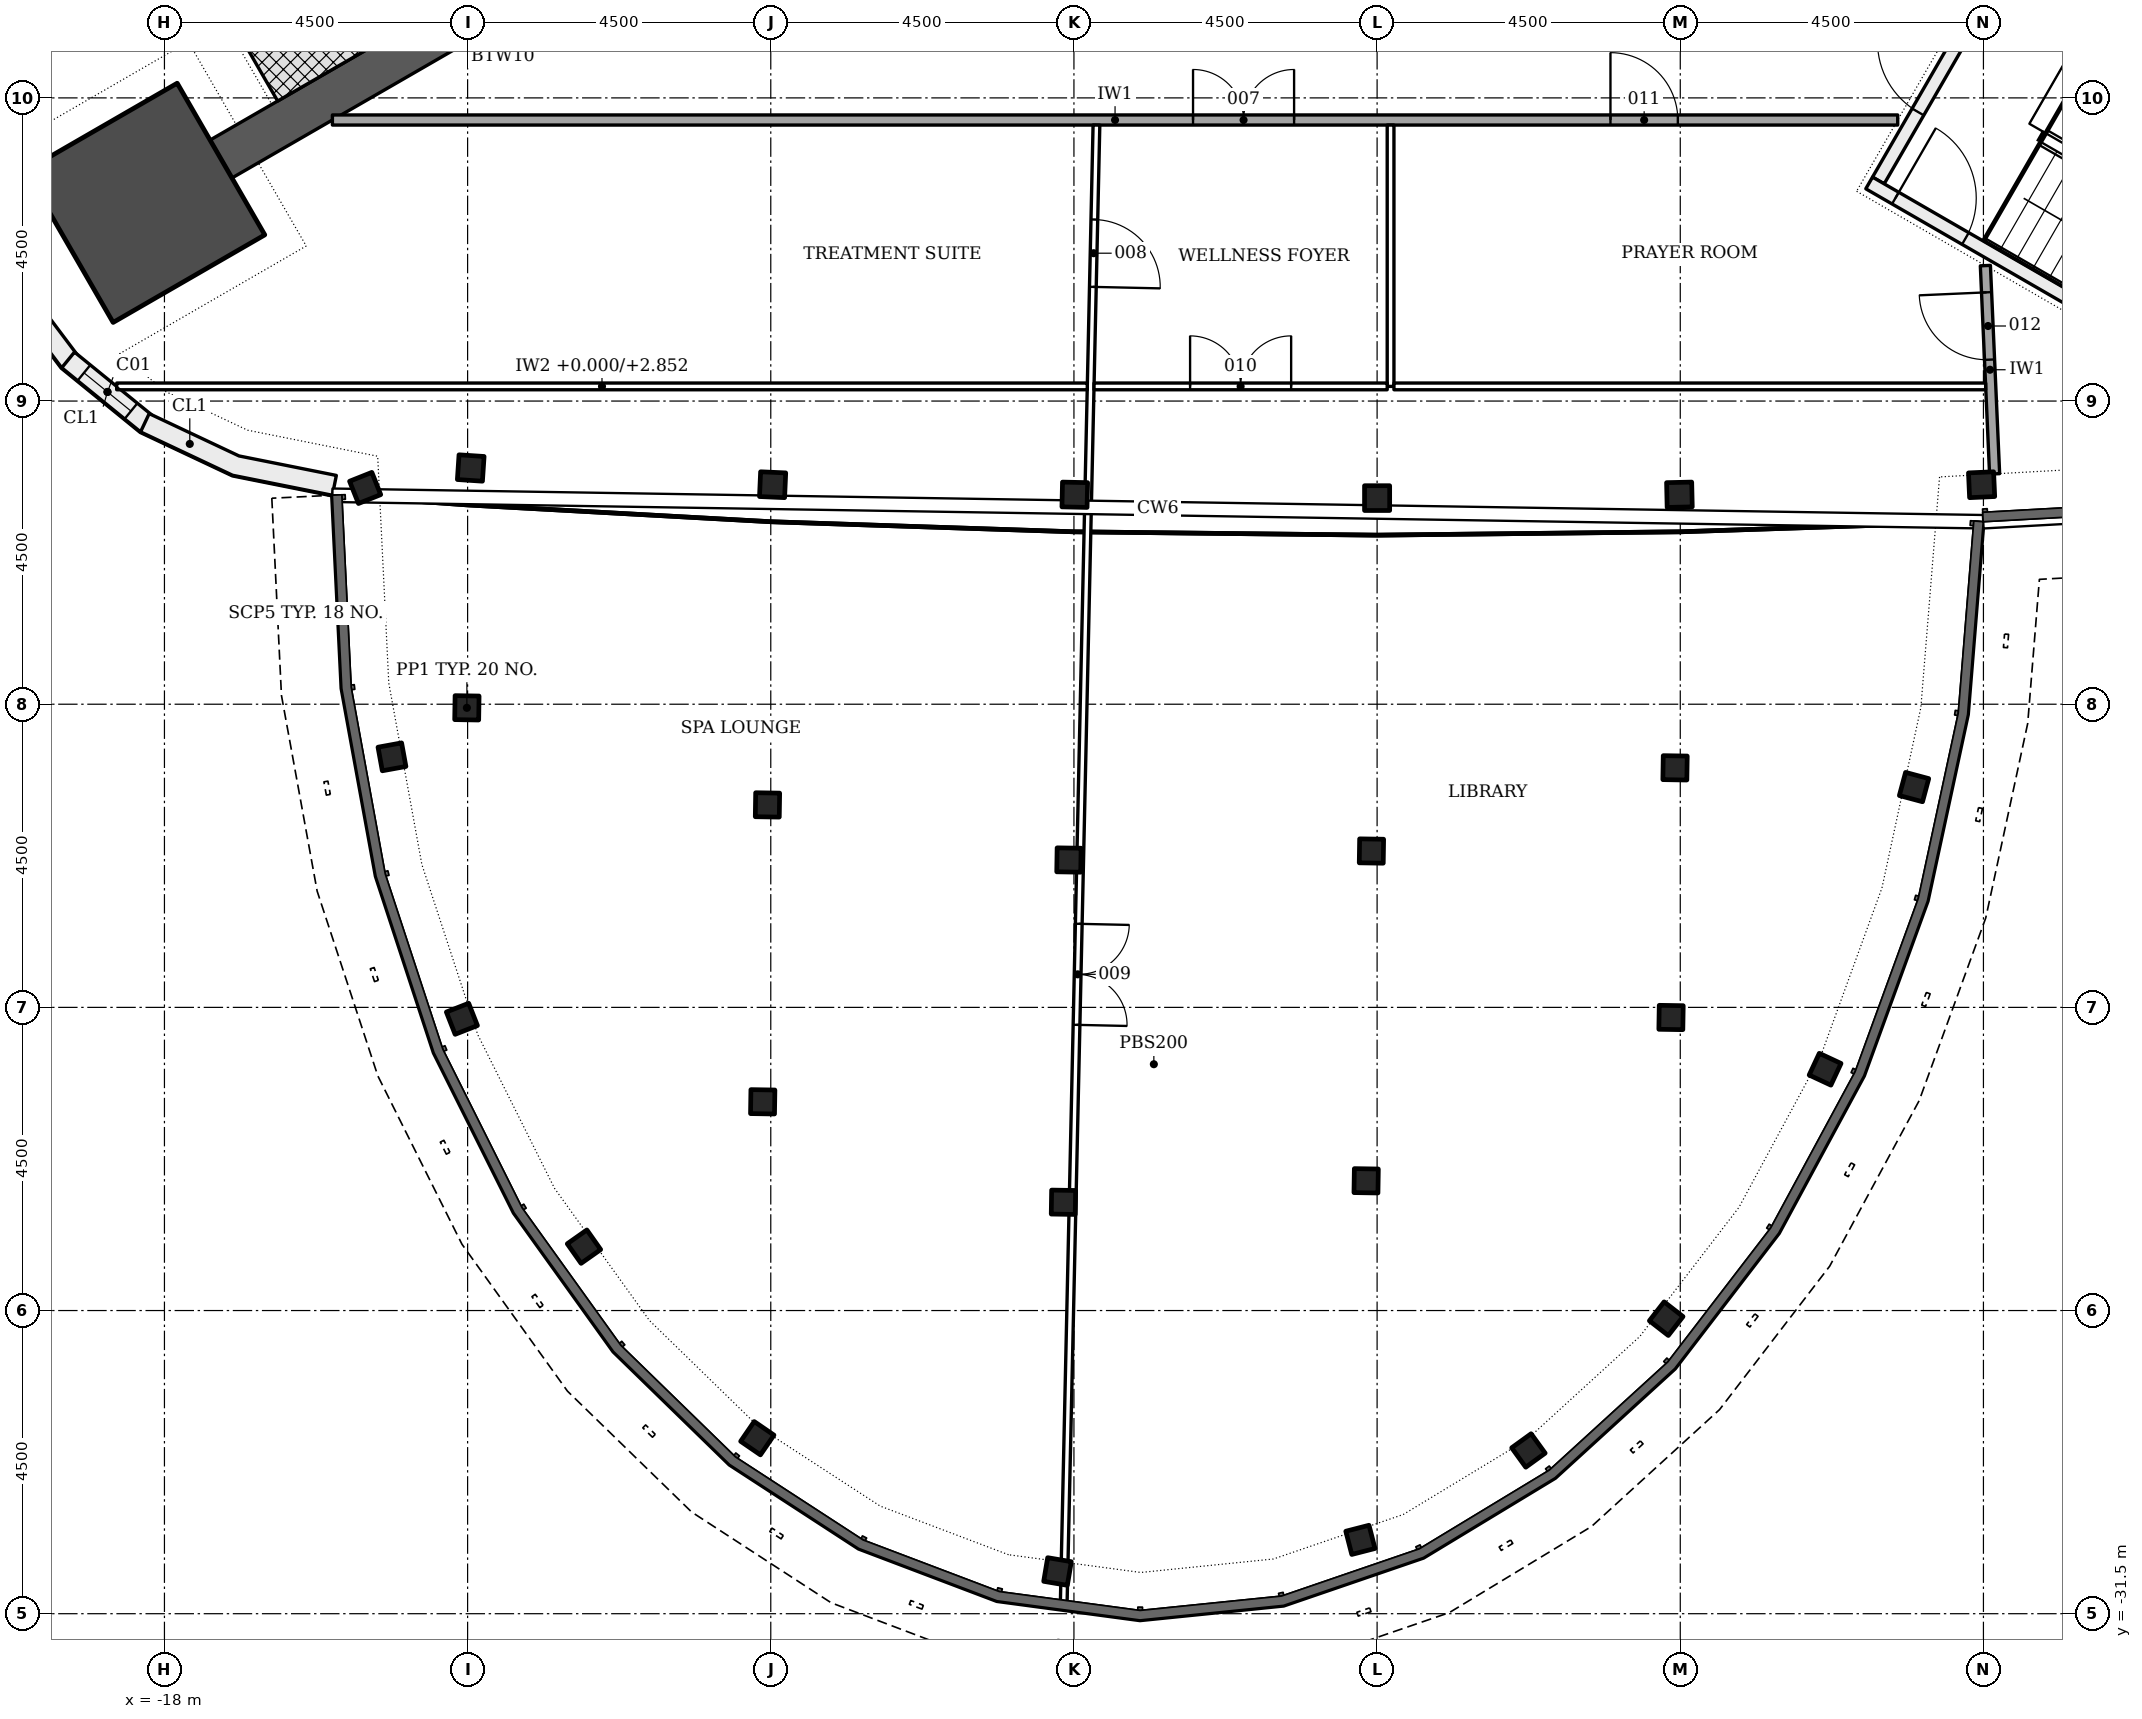
"""IFC4 building model, lengths in metres.
Left out: names, types, materials, properties, quantities, classifications, styles, units other than length and angle.
Written with IfcOpenShell. Run it as: python <this file> out.ifc"""

import sys

from ifc_helpers import new_model, si_unit, direction, frame, frame_2d, origin, origin_2d, place, context, subcontext, project, spatial, polyline, rectangle, hollow_rectangle, i_section, outline, extrude, element, fill, save


model = new_model("IFC4")
c1 = context("Model", 3, precision=1e-05, world=origin(), true_north=direction((0.0, 1.0)))
c2 = subcontext(c1, "Body", "Model", "MODEL_VIEW")
j1 = project(units=[si_unit("LENGTHUNIT", "METRE"), si_unit("PLANEANGLEUNIT", "RADIAN")], contexts=[c1])
p1 = place(None, origin())
s1 = spatial("IfcSite", under=j1, at=p1, CompositionType="ELEMENT")
p2 = place(p1, origin())
s2 = spatial("IfcBuilding", under=s1, at=p2, CompositionType="ELEMENT")
p3 = place(p2, frame((0.0, 0.0, 214.8)))
s3 = spatial("IfcBuildingStorey", under=s2, at=p3, CompositionType="ELEMENT", Elevation=214.8)
for number, where, z_axis, x_axis in (
    (1, (-9.922, -5.728, -0.2), (0.0, 0.0, 1.0), (-0.866, -0.5, 0.0)),
    (2, (9.922, -5.728, -0.2), (0.0, 0.0, 1.0), (0.866, -0.5, 0.0)),
):
    element("IfcWall", number, at=place(p3, frame(where, z_axis=z_axis, x_axis=x_axis)), inside=s3, PredefinedType="SHEAR", context=c2, shape_type="SweptSolid", body=[
        extrude(rectangle(XDim=8.359, YDim=0.65, at=frame_2d((4.179, 0.0))), origin(), (0.0, 0.0, 1.0), 3.6),
    ])
p4 = place(p3, frame((-18.286, -10.558, -0.2), z_axis=(0.0, 0.0, 1.0), x_axis=(-0.866025403784, -0.5, 0.0)))
e3 = element("IfcColumn", 3, at=p4, inside=s3, PredefinedType="COLUMN", context=c2, shape_type="SweptSolid", body=[
    extrude(rectangle(XDim=2.6, YDim=2.6, at=origin_2d()), origin(), (0.0, 0.0, 1.0), 3.6),
])
for number, where, z_axis, x_axis in (
    (4, (-13.454, -14.494, -0.2), (0.0, 0.0, 1.0), (0.998, -0.066, 0.0)),
    (5, (-8.973, -14.742, -0.2), (0.0, 0.0, 1.0), (0.999, -0.044, 0.0)),
    (6, (-4.488, -14.891, -0.2), (0.0, 0.0, 1.0), (1.0, -0.022, 0.0)),
    (7, (0.0, -14.94, -0.2), (0.0, 0.0, 1.0), (1.0, 0.0, 0.0)),
    (8, (4.488, -14.891, -0.2), (0.0, 0.0, 1.0), (1.0, 0.022, 0.0)),
    (9, (8.973, -14.742, -0.2), (0.0, 0.0, 1.0), (0.999, 0.044, 0.0)),
):
    element("IfcColumn", number, at=place(p3, frame(where, z_axis=z_axis, x_axis=x_axis)), inside=s3, PredefinedType="COLUMN", context=c2, shape_type="SweptSolid", body=[
        extrude(i_section(OverallWidth=0.373, OverallDepth=0.368, WebThickness=0.015, FlangeThickness=0.024, FilletRadius=0.015, at=origin_2d()), origin(), (0.0, 0.0, 1.0), 3.6),
    ])
for number, where, z_axis, x_axis in (
    (10, (-13.511, -18.053, -0.2), (0.0, 0.0, 1.0), (-0.016, -1.0, 0.0)),
    (11, (-9.049, -19.495, -0.2), (0.0, 0.0, 1.0), (-0.016, -1.0, 0.0)),
    (12, (-9.12, -23.902, -0.2), (0.0, 0.0, 1.0), (-0.016, -1.0, 0.0)),
    (13, (-4.574, -20.313, -0.2), (0.0, 0.0, 1.0), (-0.016, -1.0, 0.0)),
    (14, (-4.656, -25.393, -0.2), (0.0, 0.0, 1.0), (-0.016, -1.0, 0.0)),
    (15, (-0.084, -20.179, -0.2), (0.0, 0.0, 1.0), (-0.016, -1.0, 0.0)),
    (16, (-0.163, -25.074, -0.2), (0.0, 0.0, 1.0), (-0.016, -1.0, 0.0)),
    (17, (4.422, -18.944, -0.2), (0.0, 0.0, 1.0), (-0.016, -1.0, 0.0)),
    (18, (4.363, -22.65, -0.2), (0.0, 0.0, 1.0), (-0.016, -1.0, 0.0)),
    (19, (-15.021, -14.79, -0.2), (0.0, 0.0, 1.0), (0.37, -0.929, 0.0)),
    (20, (-14.623, -18.781, -0.2), (0.0, 0.0, 1.0), (0.179, -0.984, 0.0)),
    (21, (-13.585, -22.669, -0.2), (0.0, 0.0, 1.0), (0.365, -0.931, 0.0)),
    (22, (-11.773, -26.052, -0.2), (0.0, 0.0, 1.0), (0.576, -0.818, 0.0)),
    (23, (-9.2, -28.895, -0.2), (0.0, 0.0, 1.0), (0.825, -0.566, 0.0)),
    (24, (-4.744, -30.874, -0.2), (0.0, 0.0, 1.0), (0.986, -0.166, 0.0)),
    (25, (-0.248, -30.404, -0.2), (0.0, 0.0, 1.0), (0.969, 0.249, 0.0)),
    (26, (2.246, -29.077, -0.2), (0.0, 0.0, 1.0), (0.81, 0.586, 0.0)),
    (27, (4.291, -27.121, -0.2), (0.0, 0.0, 1.0), (0.614, 0.789, 0.0)),
    (28, (6.65, -23.418, -0.2), (0.0, 0.0, 1.0), (0.423, 0.906, 0.0)),
    (29, (7.97, -19.23, -0.2), (0.0, 0.0, 1.0), (0.259, 0.966, 0.0)),
):
    element("IfcColumn", number, at=place(p3, frame(where, z_axis=z_axis, x_axis=x_axis)), inside=s3, PredefinedType="COLUMN", context=c2, shape_type="SweptSolid", body=[
        extrude(hollow_rectangle(XDim=0.356, YDim=0.356, WallThickness=0.013, at=origin_2d()), origin(), (0.0, 0.0, 1.0), 3.6),
    ])
p5 = place(p3, origin())
e30 = element("IfcWall", 30, at=p5, inside=s3, PredefinedType="NOTDEFINED", context=c2, shape_type="SweptSolid", body=[
    extrude(outline(polyline([(-19.772, -4.162), (-20.656, -5.98), (-21.139, -7.411), (-21.265, -8.917), (-21.025, -10.408), (-20.434, -11.797), (-19.526, -13.004), (-19.286, -12.824), (-20.172, -11.646), (-20.735, -10.324), (-20.963, -8.905), (-20.844, -7.473), (-20.378, -6.094), (-19.502, -4.293), (-19.772, -4.162)])), origin(), (0.0, 0.0, 1.0), 3.3),
])
p6 = place(p3, frame((-18.261, -13.84, 0.0), z_axis=(0.0, 0.0, 1.0), x_axis=(-0.775543549468, 0.631294070048, 0.0)))
e31 = element("IfcWall", 31, at=p6, inside=s3, PredefinedType="NOTDEFINED", context=c2, shape_type="SweptSolid", body=[
    extrude(rectangle(XDim=1.506, YDim=0.3, at=frame_2d((0.753, 0.0))), origin(), (0.0, 0.0, 1.0), 3.3),
])
p7 = place(p6, frame((0.303, 0.0, 0.6)))
e32 = element("IfcOpeningElement", 32, at=p7, cuts=e31, PredefinedType="OPENING", context=c2, shape_type="SweptSolid", body=[
    extrude(rectangle(XDim=0.9, YDim=2.4, at=frame_2d((0.45, 1.2))), frame((0.0, 0.16, 0.0), z_axis=(0.0, -1.0, 0.0), x_axis=(1.0, 0.0, 0.0)), (0.0, 0.0, 1.0), 0.32),
])
p8 = place(p3, origin())
e33 = element("IfcWall", 33, at=p8, inside=s3, PredefinedType="NOTDEFINED", context=c2, shape_type="SweptSolid", body=[
    extrude(outline(polyline([(-18.354, -13.958), (-16.988, -14.602), (-15.507, -14.898), (-15.448, -14.604), (-16.893, -14.315), (-18.227, -13.686), (-18.354, -13.958)])), origin(), (0.0, 0.0, 1.0), 3.3),
])
p9 = place(p3, frame((-10.399, -4.901, -0.2), z_axis=(0.0, 0.0, 1.0), x_axis=(-0.866018442252, -0.500012057535, 0.0)))
e34 = element("IfcWall", 34, at=p9, inside=s3, PredefinedType="SHEAR", context=c2, shape_type="SweptSolid", body=[
    extrude(rectangle(XDim=7.2, YDim=1.261, at=frame_2d((3.6, 0.0))), origin(), (0.0, 0.0, 1.0), 3.6),
])
p10 = place(p3, frame((7.44, -10.226, -0.2), z_axis=(0.0, 0.0, 1.0), x_axis=(0.500022077904, 0.866012656725, 0.0)))
e35 = element("IfcWall", 35, at=p10, inside=s3, PredefinedType="SHEAR", context=c2, shape_type="SweptSolid", body=[
    extrude(rectangle(XDim=3.55, YDim=0.2, at=frame_2d((1.775, 0.0))), origin(), (0.0, 0.0, 1.0), 3.6),
])
p11 = place(p10, frame((1.175, 0.0, 0.2)))
e36 = element("IfcOpeningElement", 36, at=p11, cuts=e35, PredefinedType="OPENING", context=c2, shape_type="SweptSolid", body=[
    extrude(rectangle(XDim=1.2, YDim=2.1, at=frame_2d((0.6, 1.05))), frame((0.0, 0.11, 0.0), z_axis=(0.0, -1.0, 0.0), x_axis=(1.0, 0.0, 0.0)), (0.0, 0.0, 1.0), 0.22),
])
p12 = place(p3, frame((7.304, -10.262, -0.2), z_axis=(0.0, 0.0, 1.0), x_axis=(0.866026594901, -0.49999793692, 0.0)))
e37 = element("IfcWall", 37, at=p12, inside=s3, PredefinedType="SHEAR", context=c2, shape_type="SweptSolid", body=[
    extrude(rectangle(XDim=5.6, YDim=0.2, at=frame_2d((2.8, 0.0))), origin(), (0.0, 0.0, 1.0), 3.6),
])
p13 = place(p12, frame((0.45, 0.0, 0.2)))
e38 = element("IfcOpeningElement", 38, at=p13, cuts=e37, PredefinedType="OPENING", context=c2, shape_type="SweptSolid", body=[
    extrude(rectangle(XDim=1.2, YDim=2.1, at=frame_2d((0.6, 1.05))), frame((0.0, 0.11, 0.0), z_axis=(0.0, -1.0, 0.0), x_axis=(1.0, 0.0, 0.0)), (0.0, 0.0, 1.0), 0.22),
])
p14 = place(p3, frame((9.444, -6.555, -0.2), z_axis=(0.0, 0.0, 1.0), x_axis=(0.866018442252, -0.500012057535, 0.0)))
e39 = element("IfcWall", 39, at=p14, inside=s3, PredefinedType="SHEAR", context=c2, shape_type="SweptSolid", body=[
    extrude(rectangle(XDim=7.2, YDim=1.261, at=frame_2d((3.6, 0.0))), origin(), (0.0, 0.0, 1.0), 3.6),
])
p15 = place(p3, frame((15.832, -8.765, 0.0), z_axis=(0.0, 0.0, 1.0), x_axis=(-0.500005035328, 0.866022496617, 0.0)))
e40 = element("IfcWall", 40, at=p15, inside=s3, PredefinedType="PARTITIONING", context=c2, shape_type="SweptSolid", body=[
    extrude(rectangle(XDim=11.343, YDim=0.15, at=frame_2d((5.671, 0.0))), origin(), (0.0, 0.0, 1.0), 2.852),
])
p16 = place(p3, frame((-15.507, -9.328, 0.0), z_axis=(0.0, 0.0, 1.0), x_axis=(1.0, 0.0, 0.0)))
e41 = element("IfcWall", 41, at=p16, inside=s3, PredefinedType="PARTITIONING", context=c2, shape_type="SweptSolid", body=[
    extrude(rectangle(XDim=23.234, YDim=0.15, at=frame_2d((11.617, 0.0))), origin(), (0.0, 0.0, 1.0), 2.852),
])
p17 = place(p16, frame((12.775, 0.0, 0.0)))
e42 = element("IfcOpeningElement", 42, at=p17, cuts=e41, PredefinedType="OPENING", context=c2, shape_type="SweptSolid", body=[
    extrude(rectangle(XDim=1.5, YDim=2.1, at=frame_2d((0.75, 1.05))), frame((0.0, 0.085, 0.0), z_axis=(0.0, -1.0, 0.0), x_axis=(1.0, 0.0, 0.0)), (0.0, 0.0, 1.0), 0.17),
])
p18 = place(p16, frame((18.971, 0.0, 0.0)))
e43 = element("IfcOpeningElement", 43, at=p18, cuts=e41, PredefinedType="OPENING", context=c2, shape_type="SweptSolid", body=[
    extrude(rectangle(XDim=1.0, YDim=2.1, at=frame_2d((0.5, 1.05))), frame((0.0, 0.085, 0.0), z_axis=(0.0, -1.0, 0.0), x_axis=(1.0, 0.0, 0.0)), (0.0, 0.0, 1.0), 0.17),
])
p19 = place(p3, frame((9.166, -14.581, 0.0), z_axis=(0.0, 0.0, 1.0), x_axis=(-0.044258886008, 0.999020095398, 0.0)))
e44 = element("IfcWall", 44, at=p19, inside=s3, PredefinedType="PARTITIONING", context=c2, shape_type="SweptSolid", body=[
    extrude(rectangle(XDim=3.094, YDim=0.15, at=frame_2d((1.547, 0.0))), origin(), (0.0, 0.0, 1.0), 3.4),
])
p20 = place(p19, frame((1.697, 0.0, 0.0)))
e45 = element("IfcOpeningElement", 45, at=p20, cuts=e44, PredefinedType="OPENING", context=c2, shape_type="SweptSolid", body=[
    extrude(rectangle(XDim=1.0, YDim=2.1, at=frame_2d((0.5, 1.05))), frame((0.0, 0.085, 0.0), z_axis=(0.0, -1.0, 0.0), x_axis=(1.0, 0.0, 0.0)), (0.0, 0.0, 1.0), 0.17),
])
p21 = place(p3, frame((-4.166, -9.403, 0.0), z_axis=(0.0, 0.0, 1.0), x_axis=(-0.022131761569, -0.999755062568, 0.0)))
e46 = element("IfcWall", 46, at=p21, inside=s3, PredefinedType="PARTITIONING", context=c2, shape_type="SweptSolid", body=[
    extrude(rectangle(XDim=21.952, YDim=0.1, at=frame_2d((10.976, 0.0))), origin(), (0.0, 0.0, 1.0), 2.847),
])
p22 = place(p21, frame((1.403, 0.0, 0.0)))
e47 = element("IfcOpeningElement", 47, at=p22, cuts=e46, PredefinedType="OPENING", context=c2, shape_type="SweptSolid", body=[
    extrude(rectangle(XDim=1.0, YDim=2.1, at=frame_2d((0.5, 1.05))), frame((0.0, 0.06, 0.0), z_axis=(0.0, -1.0, 0.0), x_axis=(1.0, 0.0, 0.0)), (0.0, 0.0, 1.0), 0.12),
])
p23 = place(p21, frame((11.859, 0.0, 0.0)))
e48 = element("IfcOpeningElement", 48, at=p23, cuts=e46, PredefinedType="OPENING", context=c2, shape_type="SweptSolid", body=[
    extrude(rectangle(XDim=1.5, YDim=2.1, at=frame_2d((0.75, 1.05))), frame((0.0, 0.06, 0.0), z_axis=(0.0, -1.0, 0.0), x_axis=(1.0, 0.0, 0.0)), (0.0, 0.0, 1.0), 0.12),
])
p24 = place(p3, frame((0.2, -9.403, 0.0), z_axis=(0.0, 0.0, 1.0), x_axis=(0.0, -1.0, 0.0)))
e49 = element("IfcWall", 49, at=p24, inside=s3, PredefinedType="PARTITIONING", context=c2, shape_type="SweptSolid", body=[
    extrude(rectangle(XDim=3.879, YDim=0.1, at=frame_2d((1.939, 0.0))), origin(), (0.0, 0.0, 1.0), 3.4),
])
p25 = place(p3, frame((-18.709, -13.282, 0.0), z_axis=(0.0, 0.0, 1.0), x_axis=(1.0, 0.0, 0.0)))
e50 = element("IfcWall", 50, at=p25, inside=s3, PredefinedType="PARTITIONING", context=c2, shape_type="SweptSolid", body=[
    extrude(rectangle(XDim=14.407, YDim=0.1, at=frame_2d((7.204, 0.0))), origin(), (0.0, 0.0, 1.0), 2.852),
])
p26 = place(p3, frame((-4.202, -13.282, 0.0), z_axis=(0.0, 0.0, 1.0), x_axis=(1.0, 0.0, 0.0)))
e51 = element("IfcWall", 51, at=p26, inside=s3, PredefinedType="PARTITIONING", context=c2, shape_type="SweptSolid", body=[
    extrude(rectangle(XDim=4.352, YDim=0.1, at=frame_2d((2.176, 0.0))), origin(), (0.0, 0.0, 1.0), 2.852),
])
p27 = place(p26, frame((1.426, 0.0, 0.0)))
e52 = element("IfcOpeningElement", 52, at=p27, cuts=e51, PredefinedType="OPENING", context=c2, shape_type="SweptSolid", body=[
    extrude(rectangle(XDim=1.5, YDim=2.1, at=frame_2d((0.75, 1.05))), frame((0.0, 0.06, 0.0), z_axis=(0.0, -1.0, 0.0), x_axis=(1.0, 0.0, 0.0)), (0.0, 0.0, 1.0), 0.12),
])
p28 = place(p3, frame((0.25, -13.282, 0.0), z_axis=(0.0, 0.0, 1.0), x_axis=(1.0, 0.0, 0.0)))
e53 = element("IfcWall", 53, at=p28, inside=s3, PredefinedType="PARTITIONING", context=c2, shape_type="SweptSolid", body=[
    extrude(rectangle(XDim=8.783, YDim=0.1, at=frame_2d((4.392, 0.0))), origin(), (0.0, 0.0, 1.0), 2.852),
])
p29 = place(p7, origin())
e54 = element("IfcWindow", 54, at=p29, inside=s3, PartitioningType="SINGLE_PANEL", PredefinedType="WINDOW", context=c2, shape_type="SweptSolid", body=[
    extrude(rectangle(XDim=0.9, YDim=2.4, at=frame_2d((0.45, 1.2))), frame((0.0, 0.03, 0.0), z_axis=(0.0, -1.0, 0.0), x_axis=(1.0, 0.0, 0.0)), (0.0, 0.0, 1.0), 0.06),
])
fill(e32, e54)
p30 = place(p11, origin())
e55 = element("IfcDoor", 55, at=p30, inside=s3, OperationType="SINGLE_SWING_RIGHT", PredefinedType="DOOR", context=c2, shape_type="SweptSolid", body=[
    extrude(rectangle(XDim=1.2, YDim=2.1, at=frame_2d((0.6, 1.05))), frame((0.0, 0.025, 0.0), z_axis=(0.0, -1.0, 0.0), x_axis=(1.0, 0.0, 0.0)), (0.0, 0.0, 1.0), 0.05),
])
fill(e36, e55)
p31 = place(p13, origin())
e56 = element("IfcDoor", 56, at=p31, inside=s3, OperationType="SINGLE_SWING_LEFT", PredefinedType="DOOR", context=c2, shape_type="SweptSolid", body=[
    extrude(rectangle(XDim=1.2, YDim=2.1, at=frame_2d((0.6, 1.05))), frame((0.0, 0.025, 0.0), z_axis=(0.0, -1.0, 0.0), x_axis=(1.0, 0.0, 0.0)), (0.0, 0.0, 1.0), 0.05),
])
fill(e38, e56)
p32 = place(p17, origin())
e57 = element("IfcDoor", 57, at=p32, inside=s3, OperationType="DOUBLE_DOOR_SINGLE_SWING", PredefinedType="DOOR", context=c2, shape_type="SweptSolid", body=[
    extrude(rectangle(XDim=1.5, YDim=2.1, at=frame_2d((0.75, 1.05))), frame((0.0, 0.025, 0.0), z_axis=(0.0, -1.0, 0.0), x_axis=(1.0, 0.0, 0.0)), (0.0, 0.0, 1.0), 0.05),
])
fill(e42, e57)
p33 = place(p22, origin())
e58 = element("IfcDoor", 58, at=p33, inside=s3, OperationType="SINGLE_SWING_RIGHT", PredefinedType="DOOR", context=c2, shape_type="SweptSolid", body=[
    extrude(rectangle(XDim=1.0, YDim=2.1, at=frame_2d((0.5, 1.05))), frame((0.0, 0.025, 0.0), z_axis=(0.0, -1.0, 0.0), x_axis=(1.0, 0.0, 0.0)), (0.0, 0.0, 1.0), 0.05),
])
fill(e47, e58)
p34 = place(p23, origin())
e59 = element("IfcDoor", 59, at=p34, inside=s3, OperationType="DOUBLE_DOOR_SINGLE_SWING", PredefinedType="DOOR", context=c2, shape_type="SweptSolid", body=[
    extrude(rectangle(XDim=1.5, YDim=2.1, at=frame_2d((0.75, 1.05))), frame((0.0, 0.025, 0.0), z_axis=(0.0, -1.0, 0.0), x_axis=(1.0, 0.0, 0.0)), (0.0, 0.0, 1.0), 0.05),
])
fill(e48, e59)
p35 = place(p27, origin())
e60 = element("IfcDoor", 60, at=p35, inside=s3, OperationType="DOUBLE_DOOR_SINGLE_SWING", PredefinedType="DOOR", context=c2, shape_type="SweptSolid", body=[
    extrude(rectangle(XDim=1.5, YDim=2.1, at=frame_2d((0.75, 1.05))), frame((0.0, 0.025, 0.0), z_axis=(0.0, -1.0, 0.0), x_axis=(1.0, 0.0, 0.0)), (0.0, 0.0, 1.0), 0.05),
])
fill(e52, e60)
p36 = place(p18, origin())
e61 = element("IfcDoor", 61, at=p36, inside=s3, OperationType="SINGLE_SWING_LEFT", PredefinedType="DOOR", context=c2, shape_type="SweptSolid", body=[
    extrude(rectangle(XDim=1.0, YDim=2.1, at=frame_2d((0.5, 1.05))), frame((0.0, 0.025, 0.0), z_axis=(0.0, -1.0, 0.0), x_axis=(1.0, 0.0, 0.0)), (0.0, 0.0, 1.0), 0.05),
])
fill(e43, e61)
p37 = place(p20, origin())
e62 = element("IfcDoor", 62, at=p37, inside=s3, OperationType="SINGLE_SWING_RIGHT", PredefinedType="DOOR", context=c2, shape_type="SweptSolid", body=[
    extrude(rectangle(XDim=1.0, YDim=2.1, at=frame_2d((0.5, 1.05))), frame((0.0, 0.025, 0.0), z_axis=(0.0, -1.0, 0.0), x_axis=(1.0, 0.0, 0.0)), (0.0, 0.0, 1.0), 0.05),
])
fill(e45, e62)
save(model, sys.argv[1])
